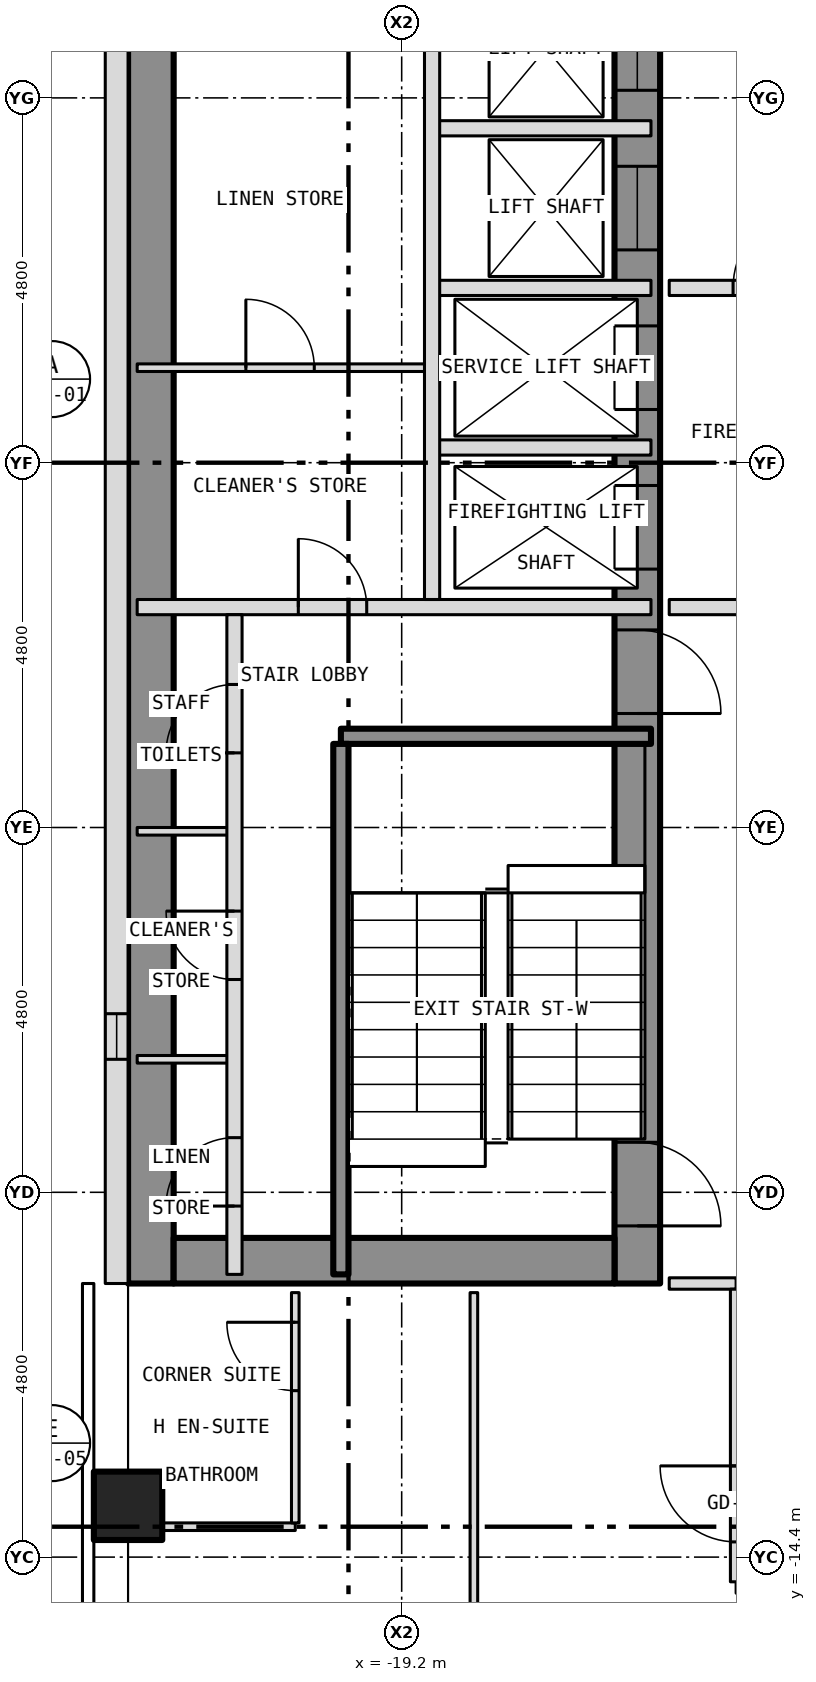
"""IFC4 building model, lengths in metres.
Left out: names, types, materials, properties, quantities, classifications, styles, units other than length and angle.
Written with IfcOpenShell. Run it as: python <this file> out.ifc"""

import sys

from ifc_helpers import new_model, si_unit, direction, frame, frame_2d, origin, origin_2d, place, context, subcontext, project, spatial, rectangle, hollow_rectangle, extrude, element, fill, save


model = new_model("IFC4")
c1 = context("Model", 3, precision=1e-05, world=origin(), true_north=direction((0.0, 1.0)))
c2 = subcontext(c1, "Body", "Model", "MODEL_VIEW")
j1 = project(units=[si_unit("LENGTHUNIT", "METRE"), si_unit("PLANEANGLEUNIT", "RADIAN")], contexts=[c1])
p1 = place(None, origin())
s1 = spatial("IfcSite", under=j1, at=p1, CompositionType="ELEMENT")
p2 = place(p1, origin())
s2 = spatial("IfcBuilding", under=s1, at=p2, CompositionType="ELEMENT")
p3 = place(p2, frame((0.0, 0.0, 113.5)))
s3 = spatial("IfcBuildingStorey", under=s2, at=p3, CompositionType="ELEMENT", Elevation=113.5)
p4 = place(p3, frame((-22.8, -13.725, -0.15), z_axis=(0.0, 0.0, 1.0), x_axis=(1.0, 0.0, 0.0)))
e1 = element("IfcColumn", 1, at=p4, inside=s3, PredefinedType="COLUMN", context=c2, shape_type="SweptSolid", body=[
    extrude(hollow_rectangle(XDim=0.9, YDim=0.9, WallThickness=0.05, at=origin_2d()), origin(), (0.0, 0.0, 1.0), 3.5),
])
p5 = place(p3, frame((-16.1, -10.8, 0.0), z_axis=(0.0, 0.0, 1.0), x_axis=(0.0, 1.0, 0.0)))
e2 = element("IfcWall", 2, at=p5, inside=s3, PredefinedType="SHEAR", context=c2, shape_type="SweptSolid", body=[
    extrude(rectangle(XDim=21.6, YDim=0.6, at=frame_2d((10.8, 0.0))), origin(), (0.0, 0.0, 1.0), 3.25),
])
p6 = place(p5, frame((9.4, 0.0, 0.0)))
e3 = element("IfcOpeningElement", 3, at=p6, cuts=e2, PredefinedType="OPENING", context=c2, shape_type="SweptSolid", body=[
    extrude(rectangle(XDim=1.1, YDim=2.1, at=frame_2d((0.55, 1.05))), frame((0.0, 0.312, 0.0), z_axis=(0.0, -1.0, 0.0), x_axis=(1.0, 0.0, 0.0)), (0.0, 0.0, 1.0), 0.624),
])
p7 = place(p5, frame((11.5, 0.0, 0.0)))
e4 = element("IfcOpeningElement", 4, at=p7, cuts=e2, PredefinedType="OPENING", context=c2, shape_type="SweptSolid", body=[
    extrude(rectangle(XDim=1.1, YDim=2.1, at=frame_2d((0.55, 1.05))), frame((0.0, 0.312, 0.0), z_axis=(0.0, -1.0, 0.0), x_axis=(1.0, 0.0, 0.0)), (0.0, 0.0, 1.0), 0.624),
])
p8 = place(p5, frame((13.6, 0.0, 0.0)))
e5 = element("IfcOpeningElement", 5, at=p8, cuts=e2, PredefinedType="OPENING", context=c2, shape_type="SweptSolid", body=[
    extrude(rectangle(XDim=1.1, YDim=2.1, at=frame_2d((0.55, 1.05))), frame((0.0, 0.312, 0.0), z_axis=(0.0, -1.0, 0.0), x_axis=(1.0, 0.0, 0.0)), (0.0, 0.0, 1.0), 0.624),
])
p9 = place(p5, frame((15.7, 0.0, 0.0)))
e6 = element("IfcOpeningElement", 6, at=p9, cuts=e2, PredefinedType="OPENING", context=c2, shape_type="SweptSolid", body=[
    extrude(rectangle(XDim=1.1, YDim=2.1, at=frame_2d((0.55, 1.05))), frame((0.0, 0.312, 0.0), z_axis=(0.0, -1.0, 0.0), x_axis=(1.0, 0.0, 0.0)), (0.0, 0.0, 1.0), 0.624),
])
p10 = place(p5, frame((17.8, 0.0, 0.0)))
e7 = element("IfcOpeningElement", 7, at=p10, cuts=e2, PredefinedType="OPENING", context=c2, shape_type="SweptSolid", body=[
    extrude(rectangle(XDim=1.1, YDim=2.1, at=frame_2d((0.55, 1.05))), frame((0.0, 0.312, 0.0), z_axis=(0.0, -1.0, 0.0), x_axis=(1.0, 0.0, 0.0)), (0.0, 0.0, 1.0), 0.624),
])
p11 = place(p5, frame((0.758, 0.0, 0.0)))
e8 = element("IfcOpeningElement", 8, at=p11, cuts=e2, PredefinedType="OPENING", context=c2, shape_type="SweptSolid", body=[
    extrude(rectangle(XDim=1.1, YDim=2.1, at=frame_2d((0.55, 1.05))), frame((0.0, 0.312, 0.0), z_axis=(0.0, -1.0, 0.0), x_axis=(1.0, 0.0, 0.0)), (0.0, 0.0, 1.0), 0.624),
])
p12 = place(p5, frame((7.5, 0.0, 0.0)))
e9 = element("IfcOpeningElement", 9, at=p12, cuts=e2, PredefinedType="OPENING", context=c2, shape_type="SweptSolid", body=[
    extrude(rectangle(XDim=1.1, YDim=2.1, at=frame_2d((0.55, 1.05))), frame((0.0, 0.312, 0.0), z_axis=(0.0, -1.0, 0.0), x_axis=(1.0, 0.0, 0.0)), (0.0, 0.0, 1.0), 0.624),
])
p13 = place(p3, frame((-22.5, -10.8, 0.0), z_axis=(0.0, 0.0, 1.0), x_axis=(0.0, 1.0, 0.0)))
e10 = element("IfcWall", 10, at=p13, inside=s3, PredefinedType="SHEAR", context=c2, shape_type="SweptSolid", body=[
    extrude(rectangle(XDim=21.6, YDim=0.6, at=frame_2d((10.8, 0.0))), origin(), (0.0, 0.0, 1.0), 3.25),
])
p14 = place(p3, frame((-22.2, -10.5, 0.0), z_axis=(0.0, 0.0, 1.0), x_axis=(1.0, 0.0, 0.0)))
e11 = element("IfcWall", 11, at=p14, inside=s3, PredefinedType="SHEAR", context=c2, shape_type="SweptSolid", body=[
    extrude(rectangle(XDim=5.8, YDim=0.6, at=frame_2d((2.9, 0.0))), origin(), (0.0, 0.0, 1.0), 3.25),
])
p15 = place(p3, frame((-22.95, 10.8, 0.0), z_axis=(0.0, 0.0, 1.0), x_axis=(0.0, -1.0, 0.0)))
e12 = element("IfcWall", 12, at=p15, inside=s3, PredefinedType="SOLIDWALL", context=c2, shape_type="SweptSolid", body=[
    extrude(rectangle(XDim=21.6, YDim=0.3, at=frame_2d((10.8, 0.0))), origin(), (0.0, 0.0, 1.0), 3.5),
])
p16 = place(p15, frame((18.05, 0.0, 1.0)))
e13 = element("IfcOpeningElement", 13, at=p16, cuts=e12, PredefinedType="OPENING", context=c2, shape_type="SweptSolid", body=[
    extrude(rectangle(XDim=0.6, YDim=1.5, at=frame_2d((0.3, 0.75))), frame((0.0, 0.162, 0.0), z_axis=(0.0, -1.0, 0.0), x_axis=(1.0, 0.0, 0.0)), (0.0, 0.0, 1.0), 0.324),
])
p17 = place(p3, frame((-22.68, -14.0, 0.0), z_axis=(0.0, 0.0, 1.0), x_axis=(1.0, 0.0, 0.0)))
e14 = element("IfcWall", 14, at=p17, inside=s3, PredefinedType="PARTITIONING", context=c2, shape_type="SweptSolid", body=[
    extrude(rectangle(XDim=2.08, YDim=0.1, at=frame_2d((1.04, 0.0))), origin(), (0.0, 0.0, 1.0), 3.35),
])
p18 = place(p3, frame((-15.68, -10.8, 0.0), z_axis=(0.0, 0.0, 1.0), x_axis=(1.0, 0.0, 0.0)))
e15 = element("IfcWall", 15, at=p18, inside=s3, PredefinedType="PARTITIONING", context=c2, shape_type="SweptSolid", body=[
    extrude(rectangle(XDim=0.88, YDim=0.15, at=frame_2d((0.44, 0.0))), origin(), (0.0, 0.0, 1.0), 3.35),
])
for number, where, z_axis, x_axis in (
    (16, (-22.68, -7.85, 0.0), (0.0, 0.0, 1.0), (1.0, 0.0, 0.0)),
    (17, (-22.68, -4.85, 0.0), (0.0, 0.0, 1.0), (1.0, 0.0, 0.0)),
):
    element("IfcWall", number, at=place(p3, frame(where, z_axis=z_axis, x_axis=x_axis)), inside=s3, PredefinedType="PARTITIONING", context=c2, shape_type="SweptSolid", body=[
        extrude(rectangle(XDim=1.28, YDim=0.1, at=frame_2d((0.64, 0.0))), origin(), (0.0, 0.0, 1.0), 3.25),
    ])
p19 = place(p3, frame((-20.0, -3.6, 0.0), z_axis=(0.0, 0.0, 1.0), x_axis=(1.0, 0.0, 0.0)))
e18 = element("IfcWall", 18, at=p19, inside=s3, PredefinedType="SHEAR", context=c2, shape_type="SweptSolid", body=[
    extrude(rectangle(XDim=4.08, YDim=0.2, at=frame_2d((2.04, 0.0))), origin(), (0.0, 0.0, 1.0), 3.25),
])
p20 = place(p3, frame((-22.68, -1.9, 0.0), z_axis=(0.0, 0.0, 1.0), x_axis=(1.0, 0.0, 0.0)))
e19 = element("IfcWall", 19, at=p20, inside=s3, PredefinedType="PARTITIONING", context=c2, shape_type="SweptSolid", body=[
    extrude(rectangle(XDim=6.76, YDim=0.2, at=frame_2d((3.38, 0.0))), origin(), (0.0, 0.0, 1.0), 3.25),
])
p21 = place(p20, frame((2.12, 0.0, 0.0)))
e20 = element("IfcOpeningElement", 20, at=p21, cuts=e19, PredefinedType="OPENING", context=c2, shape_type="SweptSolid", body=[
    extrude(rectangle(XDim=0.9, YDim=2.1, at=frame_2d((0.45, 1.05))), frame((0.0, 0.112, 0.0), z_axis=(0.0, -1.0, 0.0), x_axis=(1.0, 0.0, 0.0)), (0.0, 0.0, 1.0), 0.224),
])
p22 = place(p3, frame((-15.68, -1.9, 0.0), z_axis=(0.0, 0.0, 1.0), x_axis=(1.0, 0.0, 0.0)))
e21 = element("IfcWall", 21, at=p22, inside=s3, PredefinedType="PARTITIONING", context=c2, shape_type="SweptSolid", body=[
    extrude(rectangle(XDim=3.28, YDim=0.2, at=frame_2d((1.64, 0.0))), origin(), (0.0, 0.0, 1.0), 3.35),
])
p23 = place(p22, frame((0.94, 0.0, 0.0)))
e22 = element("IfcOpeningElement", 22, at=p23, cuts=e21, PredefinedType="OPENING", context=c2, shape_type="SweptSolid", body=[
    extrude(rectangle(XDim=1.1, YDim=2.1, at=frame_2d((0.55, 1.05))), frame((0.0, 0.112, 0.0), z_axis=(0.0, -1.0, 0.0), x_axis=(1.0, 0.0, 0.0)), (0.0, 0.0, 1.0), 0.224),
])
p24 = place(p3, frame((-18.8, 0.2, 0.0), z_axis=(0.0, 0.0, 1.0), x_axis=(1.0, 0.0, 0.0)))
e23 = element("IfcWall", 23, at=p24, inside=s3, PredefinedType="PARTITIONING", context=c2, shape_type="SweptSolid", body=[
    extrude(rectangle(XDim=2.88, YDim=0.2, at=frame_2d((1.44, 0.0))), origin(), (0.0, 0.0, 1.0), 3.25),
])
p25 = place(p3, frame((-22.68, 1.25, 0.0), z_axis=(0.0, 0.0, 1.0), x_axis=(1.0, 0.0, 0.0)))
e24 = element("IfcWall", 24, at=p25, inside=s3, PredefinedType="PARTITIONING", context=c2, shape_type="SweptSolid", body=[
    extrude(rectangle(XDim=3.88, YDim=0.1, at=frame_2d((1.94, 0.0))), origin(), (0.0, 0.0, 1.0), 3.25),
])
p26 = place(p25, frame((1.43, 0.0, 0.0)))
e25 = element("IfcOpeningElement", 25, at=p26, cuts=e24, PredefinedType="OPENING", context=c2, shape_type="SweptSolid", body=[
    extrude(rectangle(XDim=0.9, YDim=2.1, at=frame_2d((0.45, 1.05))), frame((0.0, 0.062, 0.0), z_axis=(0.0, -1.0, 0.0), x_axis=(1.0, 0.0, 0.0)), (0.0, 0.0, 1.0), 0.124),
])
p27 = place(p3, frame((-18.8, 2.3, 0.0), z_axis=(0.0, 0.0, 1.0), x_axis=(1.0, 0.0, 0.0)))
e26 = element("IfcWall", 26, at=p27, inside=s3, PredefinedType="PARTITIONING", context=c2, shape_type="SweptSolid", body=[
    extrude(rectangle(XDim=2.88, YDim=0.2, at=frame_2d((1.44, 0.0))), origin(), (0.0, 0.0, 1.0), 3.25),
])
p28 = place(p3, frame((-15.68, 2.3, 0.0), z_axis=(0.0, 0.0, 1.0), x_axis=(1.0, 0.0, 0.0)))
e27 = element("IfcWall", 27, at=p28, inside=s3, PredefinedType="PARTITIONING", context=c2, shape_type="SweptSolid", body=[
    extrude(rectangle(XDim=3.28, YDim=0.2, at=frame_2d((1.64, 0.0))), origin(), (0.0, 0.0, 1.0), 3.35),
])
p29 = place(p28, frame((0.84, 0.0, 0.0)))
e28 = element("IfcOpeningElement", 28, at=p29, cuts=e27, PredefinedType="OPENING", context=c2, shape_type="SweptSolid", body=[
    extrude(rectangle(XDim=1.1, YDim=2.1, at=frame_2d((0.55, 1.05))), frame((0.0, 0.112, 0.0), z_axis=(0.0, -1.0, 0.0), x_axis=(1.0, 0.0, 0.0)), (0.0, 0.0, 1.0), 0.224),
])
p30 = place(p3, frame((-18.8, 4.4, 0.0), z_axis=(0.0, 0.0, 1.0), x_axis=(1.0, 0.0, 0.0)))
e29 = element("IfcWall", 29, at=p30, inside=s3, PredefinedType="PARTITIONING", context=c2, shape_type="SweptSolid", body=[
    extrude(rectangle(XDim=2.88, YDim=0.2, at=frame_2d((1.44, 0.0))), origin(), (0.0, 0.0, 1.0), 3.25),
])
p31 = place(p3, frame((-21.4, -10.68, 0.0), z_axis=(0.0, 0.0, 1.0), x_axis=(0.0, 1.0, 0.0)))
e30 = element("IfcWall", 30, at=p31, inside=s3, PredefinedType="PARTITIONING", context=c2, shape_type="SweptSolid", body=[
    extrude(rectangle(XDim=8.68, YDim=0.2, at=frame_2d((4.34, 0.0))), origin(), (0.0, 0.0, 1.0), 3.25),
])
p32 = place(p31, frame((0.899, 0.0, 0.0)))
e31 = element("IfcOpeningElement", 31, at=p32, cuts=e30, PredefinedType="OPENING", context=c2, shape_type="SweptSolid", body=[
    extrude(rectangle(XDim=0.9, YDim=2.1, at=frame_2d((0.45, 1.05))), frame((0.0, 0.112, 0.0), z_axis=(0.0, -1.0, 0.0), x_axis=(1.0, 0.0, 0.0)), (0.0, 0.0, 1.0), 0.224),
])
p33 = place(p31, frame((3.88, 0.0, 0.0)))
e32 = element("IfcOpeningElement", 32, at=p33, cuts=e30, PredefinedType="OPENING", context=c2, shape_type="SweptSolid", body=[
    extrude(rectangle(XDim=0.9, YDim=2.1, at=frame_2d((0.45, 1.05))), frame((0.0, 0.112, 0.0), z_axis=(0.0, -1.0, 0.0), x_axis=(1.0, 0.0, 0.0)), (0.0, 0.0, 1.0), 0.224),
])
p34 = place(p31, frame((6.862, 0.0, 0.0)))
e33 = element("IfcOpeningElement", 33, at=p34, cuts=e30, PredefinedType="OPENING", context=c2, shape_type="SweptSolid", body=[
    extrude(rectangle(XDim=0.9, YDim=2.1, at=frame_2d((0.45, 1.05))), frame((0.0, 0.112, 0.0), z_axis=(0.0, -1.0, 0.0), x_axis=(1.0, 0.0, 0.0)), (0.0, 0.0, 1.0), 0.224),
])
p35 = place(p3, frame((-20.6, -13.95, 0.0), z_axis=(0.0, 0.0, 1.0), x_axis=(0.0, 1.0, 0.0)))
e34 = element("IfcWall", 34, at=p35, inside=s3, PredefinedType="PARTITIONING", context=c2, shape_type="SweptSolid", body=[
    extrude(rectangle(XDim=3.03, YDim=0.1, at=frame_2d((1.515, 0.0))), origin(), (0.0, 0.0, 1.0), 3.35),
])
p36 = place(p35, frame((1.74, 0.0, 0.0)))
e35 = element("IfcOpeningElement", 35, at=p36, cuts=e34, PredefinedType="OPENING", context=c2, shape_type="SweptSolid", body=[
    extrude(rectangle(XDim=0.9, YDim=2.1, at=frame_2d((0.45, 1.05))), frame((0.0, 0.062, 0.0), z_axis=(0.0, -1.0, 0.0), x_axis=(1.0, 0.0, 0.0)), (0.0, 0.0, 1.0), 0.124),
])
p37 = place(p3, frame((-20.0, -10.68, 0.0), z_axis=(0.0, 0.0, 1.0), x_axis=(0.0, 1.0, 0.0)))
e36 = element("IfcWall", 36, at=p37, inside=s3, PredefinedType="SHEAR", context=c2, shape_type="SweptSolid", body=[
    extrude(rectangle(XDim=6.98, YDim=0.2, at=frame_2d((3.49, 0.0))), origin(), (0.0, 0.0, 1.0), 3.25),
])
p38 = place(p3, frame((-18.8, -1.8, 0.0), z_axis=(0.0, 0.0, 1.0), x_axis=(0.0, 1.0, 0.0)))
e37 = element("IfcWall", 37, at=p38, inside=s3, PredefinedType="PARTITIONING", context=c2, shape_type="SweptSolid", body=[
    extrude(rectangle(XDim=12.48, YDim=0.2, at=frame_2d((6.24, 0.0))), origin(), (0.0, 0.0, 1.0), 3.25),
])
p39 = place(p3, frame((-18.25, -18.191, 0.0), z_axis=(0.0, 0.0, 1.0), x_axis=(0.0, 1.0, 0.0)))
e38 = element("IfcWall", 38, at=p39, inside=s3, PredefinedType="PARTITIONING", context=c2, shape_type="SweptSolid", body=[
    extrude(rectangle(XDim=7.271, YDim=0.1, at=frame_2d((3.635, 0.0))), origin(), (0.0, 0.0, 1.0), 3.35),
])
p40 = place(p39, frame((0.941, 0.0, 0.0)))
e39 = element("IfcOpeningElement", 39, at=p40, cuts=e38, PredefinedType="OPENING", context=c2, shape_type="SweptSolid", body=[
    extrude(rectangle(XDim=0.9, YDim=2.1, at=frame_2d((0.45, 1.05))), frame((0.0, 0.062, 0.0), z_axis=(0.0, -1.0, 0.0), x_axis=(1.0, 0.0, 0.0)), (0.0, 0.0, 1.0), 0.124),
])
p41 = place(p3, frame((-14.8, -14.725, 0.0), z_axis=(0.0, 0.0, 1.0), x_axis=(0.0, 1.0, 0.0)))
e40 = element("IfcWall", 40, at=p41, inside=s3, PredefinedType="PARTITIONING", context=c2, shape_type="SweptSolid", body=[
    extrude(rectangle(XDim=3.85, YDim=0.15, at=frame_2d((1.925, 0.0))), origin(), (0.0, 0.0, 1.0), 3.35),
])
p42 = place(p41, frame((0.525, 0.0, 0.0)))
e41 = element("IfcOpeningElement", 41, at=p42, cuts=e40, PredefinedType="OPENING", context=c2, shape_type="SweptSolid", body=[
    extrude(rectangle(XDim=1.0, YDim=2.1, at=frame_2d((0.5, 1.05))), frame((0.0, 0.087, 0.0), z_axis=(0.0, -1.0, 0.0), x_axis=(1.0, 0.0, 0.0)), (0.0, 0.0, 1.0), 0.174),
])
p43 = place(p16, origin())
e42 = element("IfcWindow", 42, at=p43, inside=s3, PartitioningType="SINGLE_PANEL", PredefinedType="WINDOW", context=c2, shape_type="SweptSolid", body=[
    extrude(rectangle(XDim=0.6, YDim=1.5, at=frame_2d((0.3, 0.75))), frame((0.0, -0.06, 0.0), z_axis=(0.0, -1.0, 0.0), x_axis=(1.0, 0.0, 0.0)), (0.0, 0.0, 1.0), 0.06),
])
fill(e13, e42)
p44 = place(p6, origin())
e43 = element("IfcDoor", 43, at=p44, inside=s3, OperationType="SLIDING_TO_LEFT", PredefinedType="DOOR", context=c2, shape_type="SweptSolid", body=[
    extrude(rectangle(XDim=1.1, YDim=2.1, at=frame_2d((0.55, 1.05))), frame((0.0, 0.025, 0.0), z_axis=(0.0, -1.0, 0.0), x_axis=(1.0, 0.0, 0.0)), (0.0, 0.0, 1.0), 0.05),
])
fill(e3, e43)
p45 = place(p7, origin())
e44 = element("IfcDoor", 44, at=p45, inside=s3, OperationType="SLIDING_TO_LEFT", PredefinedType="DOOR", context=c2, shape_type="SweptSolid", body=[
    extrude(rectangle(XDim=1.1, YDim=2.1, at=frame_2d((0.55, 1.05))), frame((0.0, 0.025, 0.0), z_axis=(0.0, -1.0, 0.0), x_axis=(1.0, 0.0, 0.0)), (0.0, 0.0, 1.0), 0.05),
])
fill(e4, e44)
p46 = place(p8, origin())
e45 = element("IfcDoor", 45, at=p46, inside=s3, OperationType="SLIDING_TO_LEFT", PredefinedType="DOOR", context=c2, shape_type="SweptSolid", body=[
    extrude(rectangle(XDim=1.1, YDim=2.1, at=frame_2d((0.55, 1.05))), frame((0.0, 0.025, 0.0), z_axis=(0.0, -1.0, 0.0), x_axis=(1.0, 0.0, 0.0)), (0.0, 0.0, 1.0), 0.05),
])
fill(e5, e45)
p47 = place(p9, origin())
e46 = element("IfcDoor", 46, at=p47, inside=s3, OperationType="SLIDING_TO_LEFT", PredefinedType="DOOR", context=c2, shape_type="SweptSolid", body=[
    extrude(rectangle(XDim=1.1, YDim=2.1, at=frame_2d((0.55, 1.05))), frame((0.0, 0.025, 0.0), z_axis=(0.0, -1.0, 0.0), x_axis=(1.0, 0.0, 0.0)), (0.0, 0.0, 1.0), 0.05),
])
fill(e6, e46)
p48 = place(p11, origin())
e47 = element("IfcDoor", 47, at=p48, inside=s3, OperationType="SINGLE_SWING_LEFT", PredefinedType="DOOR", context=c2, shape_type="SweptSolid", body=[
    extrude(rectangle(XDim=1.1, YDim=2.1, at=frame_2d((0.55, 1.05))), frame((0.0, 0.025, 0.0), z_axis=(0.0, -1.0, 0.0), x_axis=(1.0, 0.0, 0.0)), (0.0, 0.0, 1.0), 0.05),
])
fill(e8, e47)
p49 = place(p12, origin())
e48 = element("IfcDoor", 48, at=p49, inside=s3, OperationType="SINGLE_SWING_LEFT", PredefinedType="DOOR", context=c2, shape_type="SweptSolid", body=[
    extrude(rectangle(XDim=1.1, YDim=2.1, at=frame_2d((0.55, 1.05))), frame((0.0, 0.025, 0.0), z_axis=(0.0, -1.0, 0.0), x_axis=(1.0, 0.0, 0.0)), (0.0, 0.0, 1.0), 0.05),
])
fill(e9, e48)
p50 = place(p32, origin())
e49 = element("IfcDoor", 49, at=p50, inside=s3, OperationType="SINGLE_SWING_LEFT", PredefinedType="DOOR", context=c2, shape_type="SweptSolid", body=[
    extrude(rectangle(XDim=0.9, YDim=2.1, at=frame_2d((0.45, 1.05))), frame((0.0, 0.025, 0.0), z_axis=(0.0, -1.0, 0.0), x_axis=(1.0, 0.0, 0.0)), (0.0, 0.0, 1.0), 0.05),
])
fill(e31, e49)
p51 = place(p33, origin())
e50 = element("IfcDoor", 50, at=p51, inside=s3, OperationType="SINGLE_SWING_RIGHT", PredefinedType="DOOR", context=c2, shape_type="SweptSolid", body=[
    extrude(rectangle(XDim=0.9, YDim=2.1, at=frame_2d((0.45, 1.05))), frame((0.0, 0.025, 0.0), z_axis=(0.0, -1.0, 0.0), x_axis=(1.0, 0.0, 0.0)), (0.0, 0.0, 1.0), 0.05),
])
fill(e32, e50)
p52 = place(p34, origin())
e51 = element("IfcDoor", 51, at=p52, inside=s3, OperationType="SINGLE_SWING_LEFT", PredefinedType="DOOR", context=c2, shape_type="SweptSolid", body=[
    extrude(rectangle(XDim=0.9, YDim=2.1, at=frame_2d((0.45, 1.05))), frame((0.0, 0.025, 0.0), z_axis=(0.0, -1.0, 0.0), x_axis=(1.0, 0.0, 0.0)), (0.0, 0.0, 1.0), 0.05),
])
fill(e33, e51)
p53 = place(p21, origin())
e52 = element("IfcDoor", 52, at=p53, inside=s3, OperationType="SINGLE_SWING_LEFT", PredefinedType="DOOR", context=c2, shape_type="SweptSolid", body=[
    extrude(rectangle(XDim=0.9, YDim=2.1, at=frame_2d((0.45, 1.05))), frame((0.0, 0.025, 0.0), z_axis=(0.0, -1.0, 0.0), x_axis=(1.0, 0.0, 0.0)), (0.0, 0.0, 1.0), 0.05),
])
fill(e20, e52)
p54 = place(p26, origin())
e53 = element("IfcDoor", 53, at=p54, inside=s3, OperationType="SINGLE_SWING_LEFT", PredefinedType="DOOR", context=c2, shape_type="SweptSolid", body=[
    extrude(rectangle(XDim=0.9, YDim=2.1, at=frame_2d((0.45, 1.05))), frame((0.0, 0.025, 0.0), z_axis=(0.0, -1.0, 0.0), x_axis=(1.0, 0.0, 0.0)), (0.0, 0.0, 1.0), 0.05),
])
fill(e25, e53)
p55 = place(p29, origin())
e54 = element("IfcDoor", 54, at=p55, inside=s3, OperationType="SINGLE_SWING_RIGHT", PredefinedType="DOOR", context=c2, shape_type="SweptSolid", body=[
    extrude(rectangle(XDim=1.1, YDim=2.1, at=frame_2d((0.55, 1.05))), frame((0.0, 0.025, 0.0), z_axis=(0.0, -1.0, 0.0), x_axis=(1.0, 0.0, 0.0)), (0.0, 0.0, 1.0), 0.05),
])
fill(e28, e54)
p56 = place(p42, origin())
e55 = element("IfcDoor", 55, at=p56, inside=s3, OperationType="SINGLE_SWING_RIGHT", PredefinedType="DOOR", context=c2, shape_type="SweptSolid", body=[
    extrude(rectangle(XDim=1.0, YDim=2.1, at=frame_2d((0.5, 1.05))), frame((0.0, 0.025, 0.0), z_axis=(0.0, -1.0, 0.0), x_axis=(1.0, 0.0, 0.0)), (0.0, 0.0, 1.0), 0.05),
])
fill(e41, e55)
p57 = place(p36, origin())
e56 = element("IfcDoor", 56, at=p57, inside=s3, OperationType="SINGLE_SWING_RIGHT", PredefinedType="DOOR", context=c2, shape_type="SweptSolid", body=[
    extrude(rectangle(XDim=0.9, YDim=2.1, at=frame_2d((0.45, 1.05))), frame((0.0, 0.025, 0.0), z_axis=(0.0, -1.0, 0.0), x_axis=(1.0, 0.0, 0.0)), (0.0, 0.0, 1.0), 0.05),
])
fill(e35, e56)
save(model, sys.argv[1])
